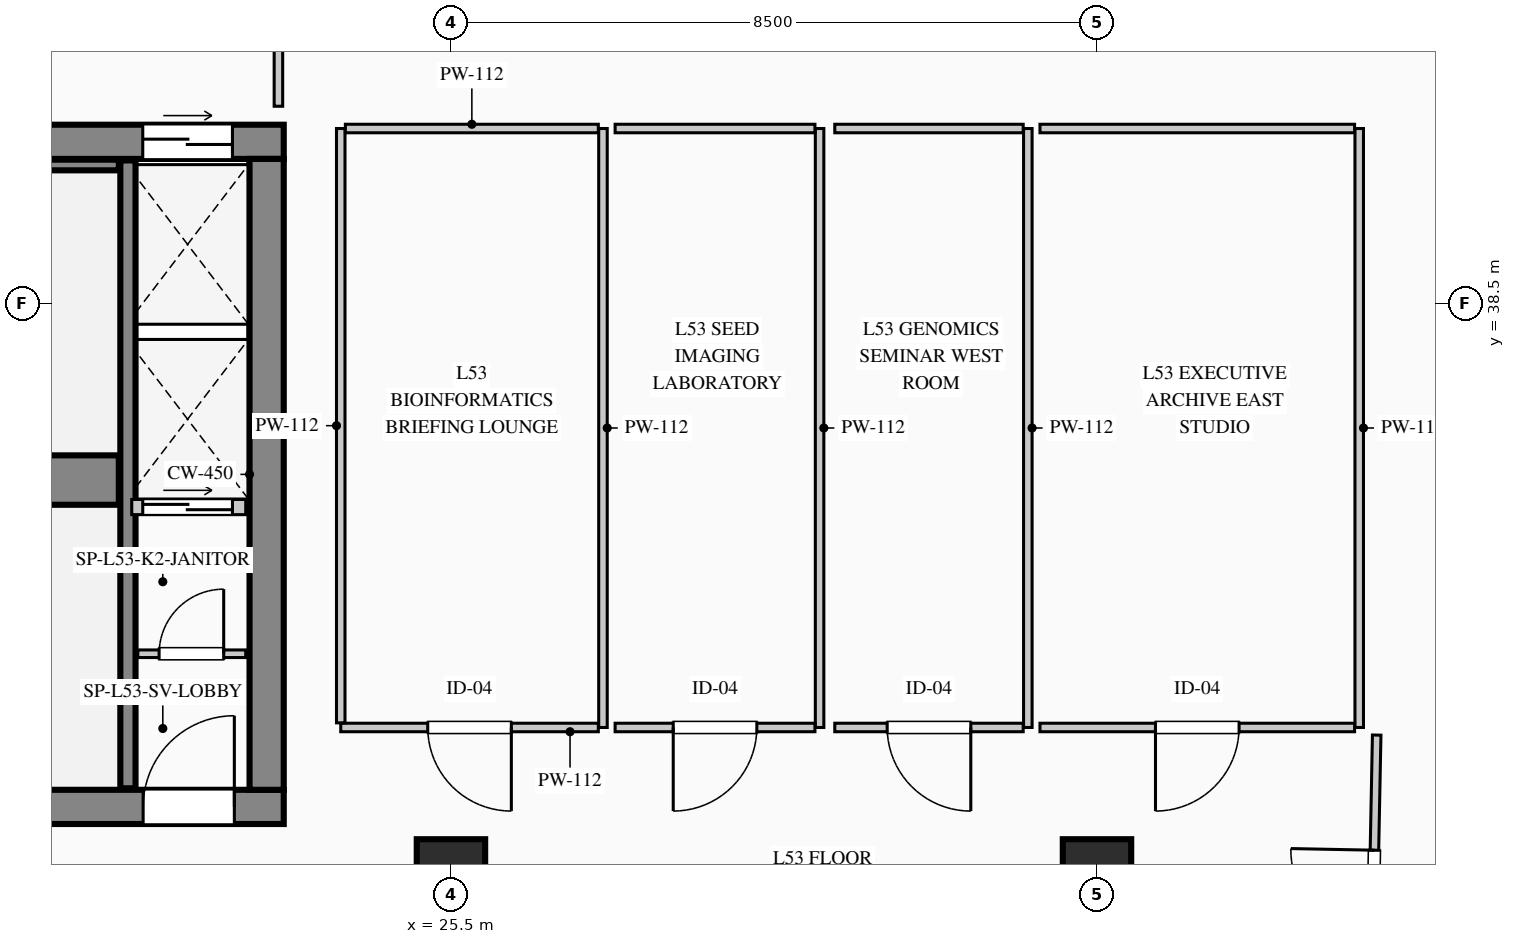
"""IFC4 building model, lengths in metres.
Left out: names, types, materials, properties, quantities, classifications, styles, units other than length and angle.
Written with IfcOpenShell. Run it as: python <this file> out.ifc"""

import sys

from ifc_helpers import new_model, si_unit, direction, frame, frame_2d, origin, origin_2d, place, context, subcontext, project, spatial, rectangle, extrude, element, fill, save


model = new_model("IFC4")
c1 = context("Model", 3, precision=1e-05, world=origin(), true_north=direction((0.0, 1.0)))
c2 = subcontext(c1, "Body", "Model", "MODEL_VIEW")
j1 = project(units=[si_unit("LENGTHUNIT", "METRE"), si_unit("PLANEANGLEUNIT", "RADIAN")], contexts=[c1])
p1 = place(None, origin())
s1 = spatial("IfcSite", under=j1, at=p1, CompositionType="ELEMENT")
p2 = place(p1, origin())
s2 = spatial("IfcBuilding", under=s1, at=p2, CompositionType="ELEMENT")
p3 = place(p2, frame((0.0, 0.0, 223.25)))
s3 = spatial("IfcBuildingStorey", under=s2, at=p3, CompositionType="ELEMENT", Elevation=223.25)
p4 = place(p3, frame((5.55, 40.625, 0.0), z_axis=(0.0, 0.0, 1.0), x_axis=(1.0, 0.0, 0.0)))
e1 = element("IfcWall", 1, at=p4, inside=s3, PredefinedType="SHEAR", context=c2, shape_type="SweptSolid", body=[
    extrude(rectangle(XDim=17.75, YDim=0.45, at=frame_2d((8.875, 0.0))), origin(), (0.0, 0.0, 1.0), 3.95),
])
p5 = place(p4, frame((15.895, 0.0, 0.0)))
e2 = element("IfcOpeningElement", 2, at=p5, cuts=e1, PredefinedType="OPENING", context=c2, shape_type="SweptSolid", body=[
    extrude(rectangle(XDim=1.18, YDim=2.25, at=frame_2d((0.59, 1.125))), frame((0.0, 0.235, 0.0), z_axis=(0.0, -1.0, 0.0), x_axis=(1.0, 0.0, 0.0)), (0.0, 0.0, 1.0), 0.47),
])
p6 = place(p3, frame((5.55, 31.875, 0.0), z_axis=(0.0, 0.0, 1.0), x_axis=(1.0, 0.0, 0.0)))
e3 = element("IfcWall", 3, at=p6, inside=s3, PredefinedType="SHEAR", context=c2, shape_type="SweptSolid", body=[
    extrude(rectangle(XDim=17.75, YDim=0.45, at=frame_2d((8.875, 0.0))), origin(), (0.0, 0.0, 1.0), 3.95),
])
p7 = place(p6, frame((3.1, 0.0, 0.0)))
e4 = element("IfcOpeningElement", 4, at=p7, cuts=e3, PredefinedType="OPENING", context=c2, shape_type="SweptSolid", body=[
    extrude(rectangle(XDim=1.2, YDim=2.2, at=frame_2d((0.6, 1.1))), frame((0.0, 0.235, 0.0), z_axis=(0.0, -1.0, 0.0), x_axis=(1.0, 0.0, 0.0)), (0.0, 0.0, 1.0), 0.47),
])
p8 = place(p6, frame((6.95, 0.0, 0.0)))
e5 = element("IfcOpeningElement", 5, at=p8, cuts=e3, PredefinedType="OPENING", context=c2, shape_type="SweptSolid", body=[
    extrude(rectangle(XDim=1.2, YDim=2.2, at=frame_2d((0.6, 1.1))), frame((0.0, 0.235, 0.0), z_axis=(0.0, -1.0, 0.0), x_axis=(1.0, 0.0, 0.0)), (0.0, 0.0, 1.0), 0.47),
])
p9 = place(p6, frame((8.8, 0.0, 0.0)))
e6 = element("IfcOpeningElement", 6, at=p9, cuts=e3, PredefinedType="OPENING", context=c2, shape_type="SweptSolid", body=[
    extrude(rectangle(XDim=1.15, YDim=2.2, at=frame_2d((0.575, 1.1))), frame((0.0, 0.235, 0.0), z_axis=(0.0, -1.0, 0.0), x_axis=(1.0, 0.0, 0.0)), (0.0, 0.0, 1.0), 0.47),
])
p10 = place(p6, frame((15.9, 0.0, 0.0)))
e7 = element("IfcOpeningElement", 7, at=p10, cuts=e3, PredefinedType="OPENING", context=c2, shape_type="SweptSolid", body=[
    extrude(rectangle(XDim=1.2, YDim=2.2, at=frame_2d((0.6, 1.1))), frame((0.0, 0.235, 0.0), z_axis=(0.0, -1.0, 0.0), x_axis=(1.0, 0.0, 0.0)), (0.0, 0.0, 1.0), 0.47),
])
p11 = place(p3, frame((23.075, 32.1, 0.0), z_axis=(0.0, 0.0, 1.0), x_axis=(0.0, 1.0, 0.0)))
e8 = element("IfcWall", 8, at=p11, inside=s3, PredefinedType="SHEAR", context=c2, shape_type="SweptSolid", body=[
    extrude(rectangle(XDim=8.3, YDim=0.45, at=frame_2d((4.15, 0.0))), origin(), (0.0, 0.0, 1.0), 3.95),
])
p12 = place(p3, frame((14.12, 36.175, 0.0), z_axis=(0.0, 0.0, 1.0), x_axis=(1.0, 0.0, 0.0)))
e9 = element("IfcWall", 9, at=p12, inside=s3, PredefinedType="SHEAR", context=c2, shape_type="SweptSolid", body=[
    extrude(rectangle(XDim=7.01, YDim=0.65, at=frame_2d((3.505, 0.0))), origin(), (0.0, 0.0, 1.0), 3.95),
])
p13 = place(p3, frame((21.25, 32.12, 0.0), z_axis=(0.0, 0.0, 1.0), x_axis=(0.0, 1.0, 0.0)))
e10 = element("IfcWall", 10, at=p13, inside=s3, PredefinedType="SHEAR", context=c2, shape_type="SweptSolid", body=[
    extrude(rectangle(XDim=8.26, YDim=0.2, at=frame_2d((4.13, 0.0))), origin(), (0.0, 0.0, 1.0), 3.95),
])
p14 = place(p3, frame((14.12, 40.32, 0.0), z_axis=(0.0, 0.0, 1.0), x_axis=(1.0, 0.0, 0.0)))
e11 = element("IfcWall", 11, at=p14, inside=s3, PredefinedType="SHEAR", context=c2, shape_type="SweptSolid", body=[
    extrude(rectangle(XDim=7.01, YDim=0.14, at=frame_2d((3.505, 0.0))), origin(), (0.0, 0.0, 1.0), 3.95),
])
for number, where, z_axis, x_axis in (
    (12, (25.5, 31.0, 0.0), (0.0, 0.0, 1.0), (1.0, 0.0, 0.0)),
    (13, (34.0, 31.0, 0.0), (0.0, 0.0, 1.0), (1.0, 0.0, 0.0)),
):
    element("IfcColumn", number, at=place(p3, frame(where, z_axis=z_axis, x_axis=x_axis)), inside=s3, PredefinedType="COLUMN", context=c2, shape_type="SweptSolid", body=[
        extrude(rectangle(XDim=0.9, YDim=0.9, at=origin_2d()), origin(), (0.0, 0.0, 1.0), 3.95),
    ])
p15 = place(p3, frame((21.38, 33.89, 0.0), z_axis=(0.0, 0.0, 1.0), x_axis=(1.0, 0.0, 0.0)))
e14 = element("IfcWall", 14, at=p15, inside=s3, PredefinedType="PARTITIONING", context=c2, shape_type="SweptSolid", body=[
    extrude(rectangle(XDim=1.42, YDim=0.1, at=frame_2d((0.71, 0.0))), origin(), (0.0, 0.0, 1.0), 3.7),
])
p16 = place(p15, frame((0.28, 0.0, 0.0)))
e15 = element("IfcOpeningElement", 15, at=p16, cuts=e14, PredefinedType="OPENING", context=c2, shape_type="SweptSolid", body=[
    extrude(rectangle(XDim=0.85, YDim=2.1, at=frame_2d((0.425, 1.05))), frame((0.0, 0.06, 0.0), z_axis=(0.0, -1.0, 0.0), x_axis=(1.0, 0.0, 0.0)), (0.0, 0.0, 1.0), 0.12),
])
p17 = place(p3, frame((21.3, 35.82, 0.0), z_axis=(0.0, 0.0, 1.0), x_axis=(1.0, 0.0, 0.0)))
e16 = element("IfcWall", 16, at=p17, inside=s3, PredefinedType="PARTITIONING", context=c2, shape_type="SweptSolid", body=[
    extrude(rectangle(XDim=1.5, YDim=0.2, at=frame_2d((0.75, 0.0))), origin(), (0.0, 0.0, 1.0), 3.7),
])
p18 = place(p17, frame((0.145, 0.0, 0.0)))
e17 = element("IfcOpeningElement", 17, at=p18, cuts=e16, PredefinedType="OPENING", context=c2, shape_type="SweptSolid", body=[
    extrude(rectangle(XDim=1.18, YDim=2.25, at=frame_2d((0.59, 1.125))), frame((0.0, 0.11, 0.0), z_axis=(0.0, -1.0, 0.0), x_axis=(1.0, 0.0, 0.0)), (0.0, 0.0, 1.0), 0.22),
])
p19 = place(p3, frame((27.5, 40.8, 0.0), z_axis=(0.0, 0.0, 1.0), x_axis=(0.0, -1.0, 0.0)))
e18 = element("IfcWall", 18, at=p19, inside=s3, PredefinedType="PARTITIONING", context=c2, shape_type="SweptSolid", body=[
    extrude(rectangle(XDim=7.88, YDim=0.112, at=frame_2d((3.94, 0.0))), origin(), (0.0, 0.0, 1.0), 3.7),
])
p20 = place(p3, frame((27.439, 32.92, 0.0), z_axis=(0.0, 0.0, 1.0), x_axis=(-1.0, 0.0, 0.0)))
e19 = element("IfcWall", 19, at=p20, inside=s3, PredefinedType="PARTITIONING", context=c2, shape_type="SweptSolid", body=[
    extrude(rectangle(XDim=3.389, YDim=0.112, at=frame_2d((1.694, 0.0))), origin(), (0.0, 0.0, 1.0), 3.7),
])
p21 = place(p20, frame((1.145, 0.0, 0.0)))
e20 = element("IfcOpeningElement", 20, at=p21, cuts=e19, PredefinedType="OPENING", context=c2, shape_type="SweptSolid", body=[
    extrude(rectangle(XDim=1.1, YDim=2.2, at=frame_2d((0.55, 1.1))), frame((0.0, 0.066, 0.0), z_axis=(0.0, -1.0, 0.0), x_axis=(1.0, 0.0, 0.0)), (0.0, 0.0, 1.0), 0.132),
])
p22 = place(p3, frame((24.05, 32.981, 0.0), z_axis=(0.0, 0.0, 1.0), x_axis=(0.0, 1.0, 0.0)))
e21 = element("IfcWall", 21, at=p22, inside=s3, PredefinedType="PARTITIONING", context=c2, shape_type="SweptSolid", body=[
    extrude(rectangle(XDim=7.819, YDim=0.112, at=frame_2d((3.91, 0.0))), origin(), (0.0, 0.0, 1.0), 3.7),
])
p23 = place(p3, frame((24.111, 40.8, 0.0), z_axis=(0.0, 0.0, 1.0), x_axis=(1.0, 0.0, 0.0)))
e22 = element("IfcWall", 22, at=p23, inside=s3, PredefinedType="PARTITIONING", context=c2, shape_type="SweptSolid", body=[
    extrude(rectangle(XDim=3.328, YDim=0.112, at=frame_2d((1.664, 0.0))), origin(), (0.0, 0.0, 1.0), 3.7),
])
p24 = place(p3, frame((30.35, 40.8, 0.0), z_axis=(0.0, 0.0, 1.0), x_axis=(0.0, -1.0, 0.0)))
e23 = element("IfcWall", 23, at=p24, inside=s3, PredefinedType="PARTITIONING", context=c2, shape_type="SweptSolid", body=[
    extrude(rectangle(XDim=7.88, YDim=0.112, at=frame_2d((3.94, 0.0))), origin(), (0.0, 0.0, 1.0), 3.7),
])
p25 = place(p3, frame((30.289, 32.92, 0.0), z_axis=(0.0, 0.0, 1.0), x_axis=(-1.0, 0.0, 0.0)))
e24 = element("IfcWall", 24, at=p25, inside=s3, PredefinedType="PARTITIONING", context=c2, shape_type="SweptSolid", body=[
    extrude(rectangle(XDim=2.629, YDim=0.112, at=frame_2d((1.314, 0.0))), origin(), (0.0, 0.0, 1.0), 3.7),
])
p26 = place(p25, frame((0.764, 0.0, 0.0)))
e25 = element("IfcOpeningElement", 25, at=p26, cuts=e24, PredefinedType="OPENING", context=c2, shape_type="SweptSolid", body=[
    extrude(rectangle(XDim=1.1, YDim=2.2, at=frame_2d((0.55, 1.1))), frame((0.0, 0.066, 0.0), z_axis=(0.0, -1.0, 0.0), x_axis=(1.0, 0.0, 0.0)), (0.0, 0.0, 1.0), 0.132),
])
p27 = place(p3, frame((27.66, 40.8, 0.0), z_axis=(0.0, 0.0, 1.0), x_axis=(1.0, 0.0, 0.0)))
e26 = element("IfcWall", 26, at=p27, inside=s3, PredefinedType="PARTITIONING", context=c2, shape_type="SweptSolid", body=[
    extrude(rectangle(XDim=2.629, YDim=0.112, at=frame_2d((1.314, 0.0))), origin(), (0.0, 0.0, 1.0), 3.7),
])
p28 = place(p3, frame((33.09, 40.8, 0.0), z_axis=(0.0, 0.0, 1.0), x_axis=(0.0, -1.0, 0.0)))
e27 = element("IfcWall", 27, at=p28, inside=s3, PredefinedType="PARTITIONING", context=c2, shape_type="SweptSolid", body=[
    extrude(rectangle(XDim=7.88, YDim=0.112, at=frame_2d((3.94, 0.0))), origin(), (0.0, 0.0, 1.0), 3.7),
])
p29 = place(p3, frame((33.029, 32.92, 0.0), z_axis=(0.0, 0.0, 1.0), x_axis=(-1.0, 0.0, 0.0)))
e28 = element("IfcWall", 28, at=p29, inside=s3, PredefinedType="PARTITIONING", context=c2, shape_type="SweptSolid", body=[
    extrude(rectangle(XDim=2.479, YDim=0.112, at=frame_2d((1.24, 0.0))), origin(), (0.0, 0.0, 1.0), 3.7),
])
p30 = place(p29, frame((0.689, 0.0, 0.0)))
e29 = element("IfcOpeningElement", 29, at=p30, cuts=e28, PredefinedType="OPENING", context=c2, shape_type="SweptSolid", body=[
    extrude(rectangle(XDim=1.1, YDim=2.2, at=frame_2d((0.55, 1.1))), frame((0.0, 0.066, 0.0), z_axis=(0.0, -1.0, 0.0), x_axis=(1.0, 0.0, 0.0)), (0.0, 0.0, 1.0), 0.132),
])
p31 = place(p3, frame((30.55, 40.8, 0.0), z_axis=(0.0, 0.0, 1.0), x_axis=(1.0, 0.0, 0.0)))
e30 = element("IfcWall", 30, at=p31, inside=s3, PredefinedType="PARTITIONING", context=c2, shape_type="SweptSolid", body=[
    extrude(rectangle(XDim=2.479, YDim=0.112, at=frame_2d((1.24, 0.0))), origin(), (0.0, 0.0, 1.0), 3.7),
])
p32 = place(p3, frame((37.45, 40.8, 0.0), z_axis=(0.0, 0.0, 1.0), x_axis=(0.0, -1.0, 0.0)))
e31 = element("IfcWall", 31, at=p32, inside=s3, PredefinedType="PARTITIONING", context=c2, shape_type="SweptSolid", body=[
    extrude(rectangle(XDim=7.88, YDim=0.112, at=frame_2d((3.94, 0.0))), origin(), (0.0, 0.0, 1.0), 3.7),
])
p33 = place(p3, frame((37.389, 32.92, 0.0), z_axis=(0.0, 0.0, 1.0), x_axis=(-1.0, 0.0, 0.0)))
e32 = element("IfcWall", 32, at=p33, inside=s3, PredefinedType="PARTITIONING", context=c2, shape_type="SweptSolid", body=[
    extrude(rectangle(XDim=4.139, YDim=0.112, at=frame_2d((2.069, 0.0))), origin(), (0.0, 0.0, 1.0), 3.7),
])
p34 = place(p33, frame((1.52, 0.0, 0.0)))
e33 = element("IfcOpeningElement", 33, at=p34, cuts=e32, PredefinedType="OPENING", context=c2, shape_type="SweptSolid", body=[
    extrude(rectangle(XDim=1.1, YDim=2.2, at=frame_2d((0.55, 1.1))), frame((0.0, 0.066, 0.0), z_axis=(0.0, -1.0, 0.0), x_axis=(1.0, 0.0, 0.0)), (0.0, 0.0, 1.0), 0.132),
])
p35 = place(p3, frame((33.25, 40.8, 0.0), z_axis=(0.0, 0.0, 1.0), x_axis=(1.0, 0.0, 0.0)))
e34 = element("IfcWall", 34, at=p35, inside=s3, PredefinedType="PARTITIONING", context=c2, shape_type="SweptSolid", body=[
    extrude(rectangle(XDim=4.139, YDim=0.112, at=frame_2d((2.069, 0.0))), origin(), (0.0, 0.0, 1.0), 3.7),
])
p36 = place(p3, frame((37.599, 28.691, 0.0), z_axis=(0.0, 0.0, 1.0), x_axis=(0.019566997539, 0.999808547977, 0.0)))
e35 = element("IfcWall", 35, at=p36, inside=s3, PredefinedType="PARTITIONING", context=c2, shape_type="SweptSolid", body=[
    extrude(rectangle(XDim=4.13, YDim=0.112, at=frame_2d((2.065, 0.0))), origin(), (0.0, 0.0, 1.0), 3.7),
])
p37 = place(p36, frame((1.515, 0.0, 0.0)))
e36 = element("IfcOpeningElement", 36, at=p37, cuts=e35, PredefinedType="OPENING", context=c2, shape_type="SweptSolid", body=[
    extrude(rectangle(XDim=1.1, YDim=2.2, at=frame_2d((0.55, 1.1))), frame((0.0, 0.066, 0.0), z_axis=(0.0, -1.0, 0.0), x_axis=(1.0, 0.0, 0.0)), (0.0, 0.0, 1.0), 0.132),
])
p38 = place(p3, frame((23.23, 41.093, 0.0), z_axis=(0.0, 0.0, 1.0), x_axis=(0.0, 1.0, 0.0)))
e37 = element("IfcWall", 37, at=p38, inside=s3, PredefinedType="PARTITIONING", context=c2, shape_type="SweptSolid", body=[
    extrude(rectangle(XDim=2.162, YDim=0.112, at=frame_2d((1.081, 0.0))), origin(), (0.0, 0.0, 1.0), 3.7),
])
p39 = place(p10, origin())
e38 = element("IfcDoor", 38, at=p39, inside=s3, OperationType="SINGLE_SWING_RIGHT", PredefinedType="DOOR", context=c2, shape_type="SweptSolid", body=[
    extrude(rectangle(XDim=1.2, YDim=2.2, at=frame_2d((0.6, 1.1))), frame((0.0, 0.025, 0.0), z_axis=(0.0, -1.0, 0.0), x_axis=(1.0, 0.0, 0.0)), (0.0, 0.0, 1.0), 0.05),
])
fill(e7, e38)
p40 = place(p16, origin())
e39 = element("IfcDoor", 39, at=p40, inside=s3, OperationType="SINGLE_SWING_RIGHT", PredefinedType="DOOR", context=c2, shape_type="SweptSolid", body=[
    extrude(rectangle(XDim=0.85, YDim=2.1, at=frame_2d((0.425, 1.05))), frame((0.0, 0.025, 0.0), z_axis=(0.0, -1.0, 0.0), x_axis=(1.0, 0.0, 0.0)), (0.0, 0.0, 1.0), 0.05),
])
fill(e15, e39)
p41 = place(p5, origin())
e40 = element("IfcDoor", 40, at=p41, inside=s3, OperationType="DOUBLE_DOOR_SLIDING", PredefinedType="DOOR", context=c2, shape_type="SweptSolid", body=[
    extrude(rectangle(XDim=1.18, YDim=2.25, at=frame_2d((0.59, 1.125))), frame((0.0, 0.025, 0.0), z_axis=(0.0, -1.0, 0.0), x_axis=(1.0, 0.0, 0.0)), (0.0, 0.0, 1.0), 0.05),
])
fill(e2, e40)
p42 = place(p18, origin())
e41 = element("IfcDoor", 41, at=p42, inside=s3, OperationType="DOUBLE_DOOR_SLIDING", PredefinedType="DOOR", context=c2, shape_type="SweptSolid", body=[
    extrude(rectangle(XDim=1.18, YDim=2.25, at=frame_2d((0.59, 1.125))), frame((0.0, 0.025, 0.0), z_axis=(0.0, -1.0, 0.0), x_axis=(1.0, 0.0, 0.0)), (0.0, 0.0, 1.0), 0.05),
])
fill(e17, e41)
p43 = place(p21, origin())
e42 = element("IfcDoor", 42, at=p43, inside=s3, OperationType="SINGLE_SWING_LEFT", PredefinedType="DOOR", context=c2, shape_type="SweptSolid", body=[
    extrude(rectangle(XDim=1.1, YDim=2.2, at=frame_2d((0.55, 1.1))), frame((0.0, 0.025, 0.0), z_axis=(0.0, -1.0, 0.0), x_axis=(1.0, 0.0, 0.0)), (0.0, 0.0, 1.0), 0.05),
])
fill(e20, e42)
p44 = place(p26, origin())
e43 = element("IfcDoor", 43, at=p44, inside=s3, OperationType="SINGLE_SWING_RIGHT", PredefinedType="DOOR", context=c2, shape_type="SweptSolid", body=[
    extrude(rectangle(XDim=1.1, YDim=2.2, at=frame_2d((0.55, 1.1))), frame((0.0, 0.025, 0.0), z_axis=(0.0, -1.0, 0.0), x_axis=(1.0, 0.0, 0.0)), (0.0, 0.0, 1.0), 0.05),
])
fill(e25, e43)
p45 = place(p30, origin())
e44 = element("IfcDoor", 44, at=p45, inside=s3, OperationType="SINGLE_SWING_LEFT", PredefinedType="DOOR", context=c2, shape_type="SweptSolid", body=[
    extrude(rectangle(XDim=1.1, YDim=2.2, at=frame_2d((0.55, 1.1))), frame((0.0, 0.025, 0.0), z_axis=(0.0, -1.0, 0.0), x_axis=(1.0, 0.0, 0.0)), (0.0, 0.0, 1.0), 0.05),
])
fill(e29, e44)
p46 = place(p34, origin())
e45 = element("IfcDoor", 45, at=p46, inside=s3, OperationType="SINGLE_SWING_RIGHT", PredefinedType="DOOR", context=c2, shape_type="SweptSolid", body=[
    extrude(rectangle(XDim=1.1, YDim=2.2, at=frame_2d((0.55, 1.1))), frame((0.0, 0.025, 0.0), z_axis=(0.0, -1.0, 0.0), x_axis=(1.0, 0.0, 0.0)), (0.0, 0.0, 1.0), 0.05),
])
fill(e33, e45)
p47 = place(p37, origin())
e46 = element("IfcDoor", 46, at=p47, inside=s3, OperationType="SINGLE_SWING_RIGHT", PredefinedType="DOOR", context=c2, shape_type="SweptSolid", body=[
    extrude(rectangle(XDim=1.1, YDim=2.2, at=frame_2d((0.55, 1.1))), frame((0.0, 0.025, 0.0), z_axis=(0.0, -1.0, 0.0), x_axis=(1.0, 0.0, 0.0)), (0.0, 0.0, 1.0), 0.05),
])
fill(e36, e46)
save(model, sys.argv[1])
